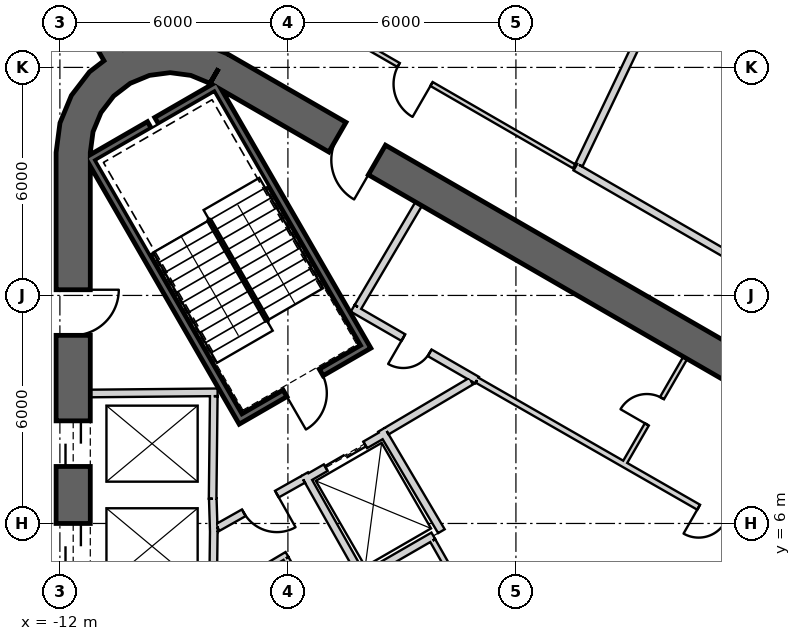
"""IFC4 building model, lengths in metres.
Left out: names, types, materials, properties, quantities, classifications, styles, units other than length and angle.
Written with IfcOpenShell. Run it as: python <this file> out.ifc"""

import sys

from ifc_helpers import new_model, si_unit, direction, frame, frame_2d, origin, place, context, subcontext, project, spatial, polyline, rectangle, outline, extrude, element, fill, save


model = new_model("IFC4")
c1 = context("Model", 3, precision=1e-05, world=origin(), true_north=direction((0.0, 1.0)))
c2 = subcontext(c1, "Body", "Model", "MODEL_VIEW")
j1 = project(units=[si_unit("LENGTHUNIT", "METRE"), si_unit("PLANEANGLEUNIT", "RADIAN")], contexts=[c1])
p1 = place(None, origin())
s1 = spatial("IfcSite", under=j1, at=p1, CompositionType="ELEMENT")
p2 = place(p1, origin())
s2 = spatial("IfcBuilding", under=s1, at=p2, CompositionType="ELEMENT")
p3 = place(p2, frame((0.0, 0.0, 380.6)))
s3 = spatial("IfcBuildingStorey", under=s2, at=p3, CompositionType="ELEMENT", Elevation=380.6)
p4 = place(p3, frame((19.475, 2.208, 0.0), z_axis=(0.0, 0.0, 1.0), x_axis=(-0.866028369851, 0.499994862586, 0.0)))
e1 = element("IfcWall", 1, at=p4, inside=s3, PredefinedType="SHEAR", context=c2, shape_type="SweptSolid", body=[
    extrude(rectangle(XDim=31.523, YDim=0.9, at=frame_2d((15.762, 0.0))), origin(), (0.0, 0.0, 1.0), 3.9),
])
p5 = place(p4, frame((7.062, 0.0, 0.0)))
e2 = element("IfcOpeningElement", 2, at=p5, cuts=e1, PredefinedType="OPENING", context=c2, shape_type="SweptSolid", body=[
    extrude(rectangle(XDim=1.2, YDim=2.4, at=frame_2d((0.6, 1.2))), frame((0.0, 0.46, 0.0), z_axis=(0.0, -1.0, 0.0), x_axis=(1.0, 0.0, 0.0)), (0.0, 0.0, 1.0), 0.92),
])
p6 = place(p4, frame((3.612, 0.0, 0.0)))
e3 = element("IfcOpeningElement", 3, at=p6, cuts=e1, PredefinedType="OPENING", context=c2, shape_type="SweptSolid", body=[
    extrude(rectangle(XDim=1.2, YDim=2.4, at=frame_2d((0.6, 1.2))), frame((0.0, 0.46, 0.0), z_axis=(0.0, -1.0, 0.0), x_axis=(1.0, 0.0, 0.0)), (0.0, 0.0, 1.0), 0.92),
])
p7 = place(p4, frame((26.712, 0.0, 0.0)))
e4 = element("IfcOpeningElement", 4, at=p7, cuts=e1, PredefinedType="OPENING", context=c2, shape_type="SweptSolid", body=[
    extrude(rectangle(XDim=1.2, YDim=2.4, at=frame_2d((0.6, 1.2))), frame((0.0, 0.46, 0.0), z_axis=(0.0, -1.0, 0.0), x_axis=(1.0, 0.0, 0.0)), (0.0, 0.0, 1.0), 0.92),
])
p8 = place(p3, frame((-11.65, 15.762, 0.0), z_axis=(0.0, 0.0, 1.0), x_axis=(0.0, -1.0, 0.0)))
e5 = element("IfcWall", 5, at=p8, inside=s3, PredefinedType="SHEAR", context=c2, shape_type="SweptSolid", body=[
    extrude(rectangle(XDim=31.523, YDim=0.9, at=frame_2d((15.762, 0.0))), origin(), (0.0, 0.0, 1.0), 3.9),
])
p9 = place(p8, frame((7.062, 0.0, 0.0)))
e6 = element("IfcOpeningElement", 6, at=p9, cuts=e5, PredefinedType="OPENING", context=c2, shape_type="SweptSolid", body=[
    extrude(rectangle(XDim=1.2, YDim=2.4, at=frame_2d((0.6, 1.2))), frame((0.0, 0.46, 0.0), z_axis=(0.0, -1.0, 0.0), x_axis=(1.0, 0.0, 0.0)), (0.0, 0.0, 1.0), 0.92),
])
p10 = place(p8, frame((9.762, 0.0, 0.0)))
e7 = element("IfcOpeningElement", 7, at=p10, cuts=e5, PredefinedType="OPENING", context=c2, shape_type="SweptSolid", body=[
    extrude(rectangle(XDim=1.2, YDim=2.4, at=frame_2d((0.6, 1.2))), frame((0.0, 0.46, 0.0), z_axis=(0.0, -1.0, 0.0), x_axis=(1.0, 0.0, 0.0)), (0.0, 0.0, 1.0), 0.92),
])
p11 = place(p8, frame((12.462, 0.0, 0.0)))
e8 = element("IfcOpeningElement", 8, at=p11, cuts=e5, PredefinedType="OPENING", context=c2, shape_type="SweptSolid", body=[
    extrude(rectangle(XDim=1.2, YDim=2.4, at=frame_2d((0.6, 1.2))), frame((0.0, 0.46, 0.0), z_axis=(0.0, -1.0, 0.0), x_axis=(1.0, 0.0, 0.0)), (0.0, 0.0, 1.0), 0.92),
])
p12 = place(p8, frame((15.162, 0.0, 0.0)))
e9 = element("IfcOpeningElement", 9, at=p12, cuts=e5, PredefinedType="OPENING", context=c2, shape_type="SweptSolid", body=[
    extrude(rectangle(XDim=1.2, YDim=2.4, at=frame_2d((0.6, 1.2))), frame((0.0, 0.46, 0.0), z_axis=(0.0, -1.0, 0.0), x_axis=(1.0, 0.0, 0.0)), (0.0, 0.0, 1.0), 0.92),
])
p13 = place(p8, frame((17.862, 0.0, 0.0)))
e10 = element("IfcOpeningElement", 10, at=p13, cuts=e5, PredefinedType="OPENING", context=c2, shape_type="SweptSolid", body=[
    extrude(rectangle(XDim=1.2, YDim=2.4, at=frame_2d((0.6, 1.2))), frame((0.0, 0.46, 0.0), z_axis=(0.0, -1.0, 0.0), x_axis=(1.0, 0.0, 0.0)), (0.0, 0.0, 1.0), 0.92),
])
p14 = place(p8, frame((20.562, 0.0, 0.0)))
e11 = element("IfcOpeningElement", 11, at=p14, cuts=e5, PredefinedType="OPENING", context=c2, shape_type="SweptSolid", body=[
    extrude(rectangle(XDim=1.2, YDim=2.4, at=frame_2d((0.6, 1.2))), frame((0.0, 0.46, 0.0), z_axis=(0.0, -1.0, 0.0), x_axis=(1.0, 0.0, 0.0)), (0.0, 0.0, 1.0), 0.92),
])
p15 = place(p8, frame((23.262, 0.0, 0.0)))
e12 = element("IfcOpeningElement", 12, at=p15, cuts=e5, PredefinedType="OPENING", context=c2, shape_type="SweptSolid", body=[
    extrude(rectangle(XDim=1.2, YDim=2.4, at=frame_2d((0.6, 1.2))), frame((0.0, 0.46, 0.0), z_axis=(0.0, -1.0, 0.0), x_axis=(1.0, 0.0, 0.0)), (0.0, 0.0, 1.0), 0.92),
])
p16 = place(p8, frame((3.612, 0.0, 0.0)))
e13 = element("IfcOpeningElement", 13, at=p16, cuts=e5, PredefinedType="OPENING", context=c2, shape_type="SweptSolid", body=[
    extrude(rectangle(XDim=1.2, YDim=2.4, at=frame_2d((0.6, 1.2))), frame((0.0, 0.46, 0.0), z_axis=(0.0, -1.0, 0.0), x_axis=(1.0, 0.0, 0.0)), (0.0, 0.0, 1.0), 0.92),
])
p17 = place(p8, frame((26.712, 0.0, 0.0)))
e14 = element("IfcOpeningElement", 14, at=p17, cuts=e5, PredefinedType="OPENING", context=c2, shape_type="SweptSolid", body=[
    extrude(rectangle(XDim=1.2, YDim=2.4, at=frame_2d((0.6, 1.2))), frame((0.0, 0.46, 0.0), z_axis=(0.0, -1.0, 0.0), x_axis=(1.0, 0.0, 0.0)), (0.0, 0.0, 1.0), 0.92),
])
p18 = place(p3, origin())
e15 = element("IfcWall", 15, at=p18, inside=s3, PredefinedType="SHEAR", context=c2, shape_type="SweptSolid", body=[
    extrude(outline(polyline([(-7.6, 18.36), (-8.323, 18.659), (-9.1, 18.762), (-9.876, 18.659), (-10.6, 18.36), (-11.221, 17.883), (-11.698, 17.262), (-11.998, 16.538), (-12.1, 15.762), (-11.2, 15.762), (-11.128, 16.305), (-10.919, 16.812), (-10.585, 17.247), (-10.15, 17.58), (-9.644, 17.79), (-9.1, 17.862), (-8.556, 17.79), (-8.05, 17.58), (-7.6, 18.36)])), origin(), (0.0, 0.0, 1.0), 3.9),
])
p19 = place(p3, frame((-10.575, 18.316, 0.0), z_axis=(0.0, 0.0, 1.0), x_axis=(-0.500011655475, 0.866018674388, 0.0)))
e16 = element("IfcWall", 16, at=p19, inside=s3, PredefinedType="SHEAR", context=c2, shape_type="SweptSolid", body=[
    extrude(rectangle(XDim=6.455, YDim=0.6, at=frame_2d((3.228, 0.0))), origin(), (0.0, 0.0, 1.0), 3.9),
])
p20 = place(p19, frame((2.05, 0.0, 0.0)))
e17 = element("IfcOpeningElement", 17, at=p20, cuts=e16, PredefinedType="OPENING", context=c2, shape_type="SweptSolid", body=[
    extrude(rectangle(XDim=1.4, YDim=2.4, at=frame_2d((0.7, 1.2))), frame((0.0, 0.31, 0.0), z_axis=(0.0, -1.0, 0.0), x_axis=(1.0, 0.0, 0.0)), (0.0, 0.0, 1.0), 0.62),
])
p21 = place(p3, frame((-11.2, 9.42, 0.0), z_axis=(0.0, 0.0, 1.0), x_axis=(0.999957167047, 0.009255488683, 0.0)))
e18 = element("IfcWall", 18, at=p21, inside=s3, PredefinedType="PLUMBINGWALL", context=c2, shape_type="SweptSolid", body=[
    extrude(rectangle(XDim=3.35, YDim=0.2, at=frame_2d((1.675, 0.0))), origin(), (0.0, 0.0, 1.0), 3.6),
])
p22 = place(p3, frame((-7.951, 9.35, 0.0), z_axis=(0.0, 0.0, 1.0), x_axis=(-0.011120469654, -0.999938165666, 0.0)))
e19 = element("IfcWall", 19, at=p22, inside=s3, PredefinedType="PLUMBINGWALL", context=c2, shape_type="SweptSolid", body=[
    extrude(rectangle(XDim=2.7, YDim=0.2, at=frame_2d((1.35, 0.0))), origin(), (0.0, 0.0, 1.0), 3.6),
])
p23 = place(p3, frame((-7.977, 6.65, 0.0), z_axis=(0.0, 0.0, 1.0), x_axis=(0.030861509705, -0.999523670164, 0.0)))
e20 = element("IfcWall", 20, at=p23, inside=s3, PredefinedType="PLUMBINGWALL", context=c2, shape_type="SweptSolid", body=[
    extrude(rectangle(XDim=0.878, YDim=0.2, at=frame_2d((0.439, 0.0))), origin(), (0.0, 0.0, 1.0), 3.6),
])
p24 = place(p3, frame((-7.949, 5.894, 0.0), z_axis=(0.0, 0.0, 1.0), x_axis=(-0.016809909365, -0.999858703491, 0.0)))
e21 = element("IfcWall", 21, at=p24, inside=s3, PredefinedType="PLUMBINGWALL", context=c2, shape_type="SweptSolid", body=[
    extrude(rectangle(XDim=1.844, YDim=0.2, at=frame_2d((0.922, 0.0))), origin(), (0.0, 0.0, 1.0), 3.6),
])
p25 = place(p3, frame((-11.245, 15.678, -0.3), z_axis=(0.0, 0.0, 1.0), x_axis=(0.499977274689, -0.866038523851, 0.0)))
e22 = element("IfcWall", 22, at=p25, inside=s3, PredefinedType="SHEAR", context=c2, shape_type="SweptSolid", body=[
    extrude(rectangle(XDim=8.1, YDim=0.2, at=frame_2d((4.05, 0.0))), origin(), (0.0, 0.0, 1.0), 3.9),
])
p26 = place(p3, frame((-7.818, 17.541, -0.3), z_axis=(0.0, 0.0, 1.0), x_axis=(-0.866088799389, -0.499890179513, 0.0)))
e23 = element("IfcWall", 23, at=p26, inside=s3, PredefinedType="SHEAR", context=c2, shape_type="SweptSolid", body=[
    extrude(rectangle(XDim=1.89, YDim=0.2, at=frame_2d((0.945, 0.0))), origin(), (0.0, 0.0, 1.0), 3.9),
])
p27 = place(p3, frame((-9.645, 16.486, -0.3), z_axis=(0.0, 0.0, 1.0), x_axis=(-0.866038843867, -0.499976720371, 0.0)))
e24 = element("IfcWall", 24, at=p27, inside=s3, PredefinedType="SHEAR", context=c2, shape_type="SweptSolid", body=[
    extrude(rectangle(XDim=1.69, YDim=0.2, at=frame_2d((0.845, 0.0))), origin(), (0.0, 0.0, 1.0), 3.9),
])
p28 = place(p3, frame((-7.854, 17.405, -0.3), z_axis=(0.0, 0.0, 1.0), x_axis=(0.499997992926, -0.866026562566, 0.0)))
e25 = element("IfcWall", 25, at=p28, inside=s3, PredefinedType="SHEAR", context=c2, shape_type="SweptSolid", body=[
    extrude(rectangle(XDim=7.9, YDim=0.2, at=frame_2d((3.95, 0.0))), origin(), (0.0, 0.0, 1.0), 3.9),
])
p29 = place(p3, frame((-7.159, 8.8, -0.3), z_axis=(0.0, 0.0, 1.0), x_axis=(0.866047807691, 0.499961193289, 0.0)))
e26 = element("IfcWall", 26, at=p29, inside=s3, PredefinedType="SHEAR", context=c2, shape_type="SweptSolid", body=[
    extrude(rectangle(XDim=3.6, YDim=0.2, at=frame_2d((1.8, 0.0))), origin(), (0.0, 0.0, 1.0), 3.9),
])
p30 = place(p29, frame((1.25, 0.0, 0.3)))
e27 = element("IfcOpeningElement", 27, at=p30, cuts=e26, PredefinedType="OPENING", context=c2, shape_type="SweptSolid", body=[
    extrude(rectangle(XDim=1.1, YDim=2.1, at=frame_2d((0.55, 1.05))), frame((0.0, 0.11, 0.0), z_axis=(0.0, -1.0, 0.0), x_axis=(1.0, 0.0, 0.0)), (0.0, 0.0, 1.0), 0.22),
])
p31 = place(p3, frame((-5.524, 7.168, 0.0), z_axis=(0.0, 0.0, 1.0), x_axis=(0.866024647952, 0.500001309137, 0.0)))
e28 = element("IfcWall", 28, at=p31, inside=s3, PredefinedType="PLUMBINGWALL", context=c2, shape_type="SweptSolid", body=[
    extrude(rectangle(XDim=2.4, YDim=0.2, at=frame_2d((1.2, 0.0))), origin(), (0.0, 0.0, 1.0), 3.6),
])
p32 = place(p31, frame((0.6, 0.0, 0.0)))
e29 = element("IfcOpeningElement", 29, at=p32, cuts=e28, PredefinedType="OPENING", context=c2, shape_type="SweptSolid", body=[
    extrude(rectangle(XDim=1.2, YDim=2.4, at=frame_2d((0.6, 1.2))), frame((0.0, 0.11, 0.0), z_axis=(0.0, -1.0, 0.0), x_axis=(1.0, 0.0, 0.0)), (0.0, 0.0, 1.0), 0.22),
])
p33 = place(p3, frame((-4.039, 4.596, 0.0), z_axis=(0.0, 0.0, 1.0), x_axis=(-0.491322718731, 0.870977603649, 0.0)))
e30 = element("IfcWall", 30, at=p33, inside=s3, PredefinedType="PLUMBINGWALL", context=c2, shape_type="SweptSolid", body=[
    extrude(rectangle(XDim=3.1, YDim=0.2, at=frame_2d((1.55, 0.0))), origin(), (0.0, 0.0, 1.0), 3.6),
])
p34 = place(p3, frame((-3.538, 8.465, 0.0), z_axis=(0.0, 0.0, 1.0), x_axis=(0.508616218331, -0.860993346345, 0.0)))
e31 = element("IfcWall", 31, at=p34, inside=s3, PredefinedType="PLUMBINGWALL", context=c2, shape_type="SweptSolid", body=[
    extrude(rectangle(XDim=3.2, YDim=0.2, at=frame_2d((1.6, 0.0))), origin(), (0.0, 0.0, 1.0), 3.6),
])
p35 = place(p3, frame((-2.047, 5.746, 0.0), z_axis=(0.0, 0.0, 1.0), x_axis=(-0.866038900241, -0.499976622722, 0.0)))
e32 = element("IfcWall", 32, at=p35, inside=s3, PredefinedType="PLUMBINGWALL", context=c2, shape_type="SweptSolid", body=[
    extrude(rectangle(XDim=2.189, YDim=0.2, at=frame_2d((1.095, 0.0))), origin(), (0.0, 0.0, 1.0), 3.6),
])
p36 = place(p3, frame((4.457, 10.359, 0.0), z_axis=(0.0, 0.0, 1.0), x_axis=(-0.500017246033, -0.866015446554, 0.0)))
e33 = element("IfcWall", 33, at=p36, inside=s3, PredefinedType="PARTITIONING", context=c2, shape_type="SweptSolid", body=[
    extrude(rectangle(XDim=3.25, YDim=0.12, at=frame_2d((1.625, 0.0))), origin(), (0.0, 0.0, 1.0), 3.6),
])
p37 = place(p3, frame((7.53, 4.833, 0.0), z_axis=(0.0, 0.0, 1.0), x_axis=(-0.863270393362, 0.50474174381, 0.0)))
e34 = element("IfcWall", 34, at=p37, inside=s3, PredefinedType="PLUMBINGWALL", context=c2, shape_type="SweptSolid", body=[
    extrude(rectangle(XDim=5.455, YDim=0.15, at=frame_2d((2.728, 0.0))), origin(), (0.0, 0.0, 1.0), 3.6),
])
p38 = place(p3, frame((-1.024, 9.771, 0.0), z_axis=(0.0, 0.0, 1.0), x_axis=(0.866032269107, -0.499988108725, 0.0)))
e35 = element("IfcWall", 35, at=p38, inside=s3, PredefinedType="PARTITIONING", context=c2, shape_type="SweptSolid", body=[
    extrude(rectangle(XDim=1.644, YDim=0.12, at=frame_2d((0.822, 0.0))), origin(), (0.0, 0.0, 1.0), 3.6),
])
p39 = place(p38, frame((0.422, 0.0, 0.0)))
e36 = element("IfcOpeningElement", 36, at=p39, cuts=e35, PredefinedType="OPENING", context=c2, shape_type="SweptSolid", body=[
    extrude(rectangle(XDim=0.8, YDim=2.1, at=frame_2d((0.4, 1.05))), frame((0.0, 0.07, 0.0), z_axis=(0.0, -1.0, 0.0), x_axis=(1.0, 0.0, 0.0)), (0.0, 0.0, 1.0), 0.14),
])
p40 = place(p3, frame((-4.296, 11.66, 0.0), z_axis=(0.0, 0.0, 1.0), x_axis=(0.866027389382, -0.499996560828, 0.0)))
e37 = element("IfcWall", 37, at=p40, inside=s3, PredefinedType="PARTITIONING", context=c2, shape_type="SweptSolid", body=[
    extrude(rectangle(XDim=3.778, YDim=0.2, at=frame_2d((1.889, 0.0))), origin(), (0.0, 0.0, 1.0), 3.6),
])
p41 = place(p3, frame((-2.558, 14.409, 0.0), z_axis=(0.0, 0.0, 1.0), x_axis=(-0.508018930956, -0.861345903683, 0.0)))
e38 = element("IfcWall", 38, at=p41, inside=s3, PredefinedType="PARTITIONING", context=c2, shape_type="SweptSolid", body=[
    extrude(rectangle(XDim=3.15, YDim=0.2, at=frame_2d((1.575, 0.0))), origin(), (0.0, 0.0, 1.0), 3.6),
])
p42 = place(p3, frame((2.821, 7.586, 0.0), z_axis=(0.0, 0.0, 1.0), x_axis=(-0.871409832999, 0.490555708306, 0.0)))
e39 = element("IfcWall", 39, at=p42, inside=s3, PredefinedType="PLUMBINGWALL", context=c2, shape_type="SweptSolid", body=[
    extrude(rectangle(XDim=2.755, YDim=0.15, at=frame_2d((1.377, 0.0))), origin(), (0.0, 0.0, 1.0), 3.6),
])
p43 = place(p3, frame((-5.6, 7.16, 0.0), z_axis=(0.0, 0.0, 1.0), x_axis=(-0.871340486379, -0.490678873396, 0.0)))
e40 = element("IfcWall", 40, at=p43, inside=s3, PredefinedType="PARTITIONING", context=c2, shape_type="SweptSolid", body=[
    extrude(rectangle(XDim=2.581, YDim=0.2, at=frame_2d((1.291, 0.0))), origin(), (0.0, 0.0, 1.0), 3.6),
])
p44 = place(p3, frame((-1.179, 9.745, 0.0), z_axis=(0.0, 0.0, 1.0), x_axis=(-0.860630814782, -0.509229418482, 0.0)))
e41 = element("IfcWall", 41, at=p44, inside=s3, PredefinedType="PARTITIONING", context=c2, shape_type="SweptSolid", body=[
    extrude(rectangle(XDim=2.582, YDim=0.2, at=frame_2d((1.291, 0.0))), origin(), (0.0, 0.0, 1.0), 3.6),
])
p45 = place(p44, frame((0.791, 0.0, 0.0)))
e42 = element("IfcOpeningElement", 42, at=p45, cuts=e41, PredefinedType="OPENING", context=c2, shape_type="SweptSolid", body=[
    extrude(rectangle(XDim=1.0, YDim=2.1, at=frame_2d((0.5, 1.05))), frame((0.0, 0.11, 0.0), z_axis=(0.0, -1.0, 0.0), x_axis=(1.0, 0.0, 0.0)), (0.0, 0.0, 1.0), 0.22),
])
p46 = place(p3, frame((0.153, 5.285, 0.0), z_axis=(0.0, 0.0, 1.0), x_axis=(-0.866025371046, -0.500000056704, 0.0)))
e43 = element("IfcWall", 43, at=p46, inside=s3, PredefinedType="PLUMBINGWALL", context=c2, shape_type="SweptSolid", body=[
    extrude(rectangle(XDim=1.7, YDim=0.15, at=frame_2d((0.85, 0.0))), origin(), (0.0, 0.0, 1.0), 3.6),
])
p47 = place(p3, frame((-1.449, 7.91, 0.0), z_axis=(0.0, 0.0, 1.0), x_axis=(0.499990139034, -0.866031096941, 0.0)))
e44 = element("IfcWall", 44, at=p47, inside=s3, PredefinedType="PLUMBINGWALL", context=c2, shape_type="SweptSolid", body=[
    extrude(rectangle(XDim=3.0, YDim=0.15, at=frame_2d((1.5, 0.0))), origin(), (0.0, 0.0, 1.0), 3.6),
])
p48 = place(p3, frame((0.399, 8.862, 0.0), z_axis=(0.0, 0.0, 1.0), x_axis=(-0.871852238349, -0.489769001148, 0.0)))
e45 = element("IfcWall", 45, at=p48, inside=s3, PredefinedType="PLUMBINGWALL", context=c2, shape_type="SweptSolid", body=[
    extrude(rectangle(XDim=2.002, YDim=0.15, at=frame_2d((1.001, 0.0))), origin(), (0.0, 0.0, 1.0), 3.6),
])
p49 = place(p3, frame((21.126, 4.084, 0.0), z_axis=(0.0, 0.0, 1.0), x_axis=(-0.866025296335, 0.500000186108, 0.0)))
e46 = element("IfcWall", 46, at=p49, inside=s3, PredefinedType="PARTITIONING", context=c2, shape_type="SweptSolid", body=[
    extrude(rectangle(XDim=22.523, YDim=0.12, at=frame_2d((11.262, 0.0))), origin(), (0.0, 0.0, 1.0), 2.97),
])
p50 = place(p49, frame((10.86, 0.0, 0.0)))
e47 = element("IfcOpeningElement", 47, at=p50, cuts=e46, PredefinedType="OPENING", context=c2, shape_type="SweptSolid", body=[
    extrude(rectangle(XDim=1.0, YDim=2.1, at=frame_2d((0.5, 1.05))), frame((0.0, 0.07, 0.0), z_axis=(0.0, -1.0, 0.0), x_axis=(1.0, 0.0, 0.0)), (0.0, 0.0, 1.0), 0.14),
])
p51 = place(p3, frame((1.62, 15.346, 0.0), z_axis=(0.0, 0.0, 1.0), x_axis=(-0.866024423855, 0.500001697284, 0.0)))
e48 = element("IfcWall", 48, at=p51, inside=s3, PredefinedType="PARTITIONING", context=c2, shape_type="SweptSolid", body=[
    extrude(rectangle(XDim=9.864, YDim=0.12, at=frame_2d((4.932, 0.0))), origin(), (0.0, 0.0, 1.0), 2.97),
])
p52 = place(p51, frame((4.435, 0.0, 0.0)))
e49 = element("IfcOpeningElement", 49, at=p52, cuts=e48, PredefinedType="OPENING", context=c2, shape_type="SweptSolid", body=[
    extrude(rectangle(XDim=1.0, YDim=2.1, at=frame_2d((0.5, 1.05))), frame((0.0, 0.07, 0.0), z_axis=(0.0, -1.0, 0.0), x_axis=(1.0, 0.0, 0.0)), (0.0, 0.0, 1.0), 0.14),
])
p53 = place(p3, frame((4.207, 20.766, 0.0), z_axis=(0.0, 0.0, 1.0), x_axis=(-0.431077681357, -0.902314819027, 0.0)))
e50 = element("IfcWall", 50, at=p53, inside=s3, PredefinedType="PARTITIONING", context=c2, shape_type="SweptSolid", body=[
    extrude(rectangle(XDim=5.946, YDim=0.12, at=frame_2d((2.973, 0.0))), origin(), (0.0, 0.0, 1.0), 3.6),
])
p54 = place(p30, origin())
e51 = element("IfcDoor", 51, at=p54, inside=s3, OperationType="SINGLE_SWING_LEFT", PredefinedType="USERDEFINED", context=c2, shape_type="SweptSolid", body=[
    extrude(rectangle(XDim=1.1, YDim=2.1, at=frame_2d((0.55, 1.05))), frame((0.0, 0.025, 0.0), z_axis=(0.0, -1.0, 0.0), x_axis=(1.0, 0.0, 0.0)), (0.0, 0.0, 1.0), 0.05),
])
fill(e27, e51)
p55 = place(p45, origin())
e52 = element("IfcDoor", 52, at=p55, inside=s3, OperationType="SINGLE_SWING_RIGHT", PredefinedType="USERDEFINED", context=c2, shape_type="SweptSolid", body=[
    extrude(rectangle(XDim=1.0, YDim=2.1, at=frame_2d((0.5, 1.05))), frame((0.0, 0.025, 0.0), z_axis=(0.0, -1.0, 0.0), x_axis=(1.0, 0.0, 0.0)), (0.0, 0.0, 1.0), 0.05),
])
fill(e42, e52)
p56 = place(p32, origin())
e53 = element("IfcDoor", 53, at=p56, inside=s3, OperationType="SLIDING_TO_LEFT", PredefinedType="USERDEFINED", context=c2, shape_type="SweptSolid", body=[
    extrude(rectangle(XDim=1.2, YDim=2.4, at=frame_2d((0.6, 1.2))), frame((0.0, 0.025, 0.0), z_axis=(0.0, -1.0, 0.0), x_axis=(1.0, 0.0, 0.0)), (0.0, 0.0, 1.0), 0.05),
])
fill(e29, e53)
p57 = place(p39, origin())
e54 = element("IfcDoor", 54, at=p57, inside=s3, OperationType="SINGLE_SWING_RIGHT", PredefinedType="USERDEFINED", context=c2, shape_type="SweptSolid", body=[
    extrude(rectangle(XDim=0.8, YDim=2.1, at=frame_2d((0.4, 1.05))), frame((0.0, 0.025, 0.0), z_axis=(0.0, -1.0, 0.0), x_axis=(1.0, 0.0, 0.0)), (0.0, 0.0, 1.0), 0.05),
])
fill(e36, e54)
p58 = place(p52, origin())
e55 = element("IfcDoor", 55, at=p58, inside=s3, OperationType="SINGLE_SWING_LEFT", PredefinedType="NOTDEFINED", context=c2, shape_type="SweptSolid", body=[
    extrude(rectangle(XDim=1.0, YDim=2.1, at=frame_2d((0.5, 1.05))), frame((0.0, 0.025, 0.0), z_axis=(0.0, -1.0, 0.0), x_axis=(1.0, 0.0, 0.0)), (0.0, 0.0, 1.0), 0.05),
])
fill(e49, e55)
p59 = place(p9, origin())
e56 = element("IfcDoor", 56, at=p59, inside=s3, OperationType="SLIDING_TO_LEFT", PredefinedType="USERDEFINED", context=c2, shape_type="SweptSolid", body=[
    extrude(rectangle(XDim=1.2, YDim=2.4, at=frame_2d((0.6, 1.2))), frame((0.0, 0.025, 0.0), z_axis=(0.0, -1.0, 0.0), x_axis=(1.0, 0.0, 0.0)), (0.0, 0.0, 1.0), 0.05),
])
fill(e6, e56)
p60 = place(p10, origin())
e57 = element("IfcDoor", 57, at=p60, inside=s3, OperationType="SLIDING_TO_LEFT", PredefinedType="USERDEFINED", context=c2, shape_type="SweptSolid", body=[
    extrude(rectangle(XDim=1.2, YDim=2.4, at=frame_2d((0.6, 1.2))), frame((0.0, 0.025, 0.0), z_axis=(0.0, -1.0, 0.0), x_axis=(1.0, 0.0, 0.0)), (0.0, 0.0, 1.0), 0.05),
])
fill(e7, e57)
p61 = place(p7, origin())
e58 = element("IfcDoor", 58, at=p61, inside=s3, OperationType="SINGLE_SWING_LEFT", PredefinedType="USERDEFINED", context=c2, shape_type="SweptSolid", body=[
    extrude(rectangle(XDim=1.2, YDim=2.4, at=frame_2d((0.6, 1.2))), frame((0.0, 0.025, 0.0), z_axis=(0.0, -1.0, 0.0), x_axis=(1.0, 0.0, 0.0)), (0.0, 0.0, 1.0), 0.05),
])
fill(e4, e58)
p62 = place(p16, origin())
e59 = element("IfcDoor", 59, at=p62, inside=s3, OperationType="SINGLE_SWING_RIGHT", PredefinedType="USERDEFINED", context=c2, shape_type="SweptSolid", body=[
    extrude(rectangle(XDim=1.2, YDim=2.4, at=frame_2d((0.6, 1.2))), frame((0.0, 0.025, 0.0), z_axis=(0.0, -1.0, 0.0), x_axis=(1.0, 0.0, 0.0)), (0.0, 0.0, 1.0), 0.05),
])
fill(e13, e59)
save(model, sys.argv[1])
